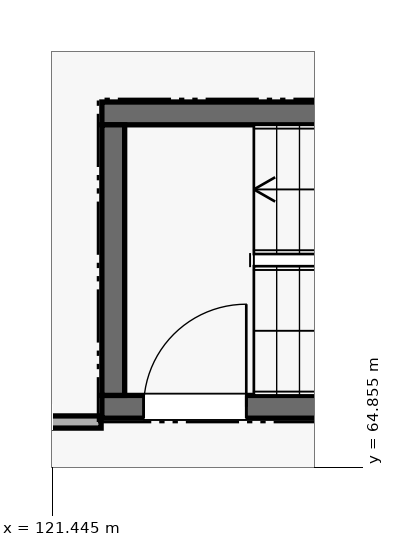
"""IFC4 building model, lengths in metres.
Left out: names, types, materials, properties, quantities, classifications, styles, units other than length and angle.
Written with IfcOpenShell. Run it as: python <this file> out.ifc"""

import sys

from ifc_helpers import new_model, si_unit, direction, frame, frame_2d, origin, place, context, subcontext, project, spatial, rectangle, extrude, element, fill, save


model = new_model("IFC4")
c1 = context("Model", 3, precision=1e-05, world=origin(), true_north=direction((0.0, 1.0)))
c2 = subcontext(c1, "Body", "Model", "MODEL_VIEW")
j1 = project(units=[si_unit("LENGTHUNIT", "METRE"), si_unit("PLANEANGLEUNIT", "RADIAN")], contexts=[c1])
p1 = place(None, origin())
s1 = spatial("IfcSite", under=j1, at=p1, CompositionType="ELEMENT")
p2 = place(p1, origin())
s2 = spatial("IfcBuilding", under=s1, at=p2, CompositionType="ELEMENT")
p3 = place(p2, frame((0.0, 0.0, 5.4)))
s3 = spatial("IfcBuildingStorey", under=s2, at=p3, CompositionType="ELEMENT", Elevation=5.4)
p4 = place(p3, frame((122.1, 65.65, 0.0), z_axis=(0.0, 0.0, 1.0), x_axis=(1.0, 0.0, 0.0)))
e1 = element("IfcWall", 1, at=p4, inside=s3, PredefinedType="SHEAR", context=c2, shape_type="SweptSolid", body=[
    extrude(rectangle(XDim=8.65, YDim=0.3, at=frame_2d((4.325, 0.0))), origin(), (0.0, 0.0, 1.0), 4.28),
])
p5 = place(p4, frame((0.55, 0.0, 0.0)))
e2 = element("IfcOpeningElement", 2, at=p5, cuts=e1, PredefinedType="OPENING", context=c2, shape_type="SweptSolid", body=[
    extrude(rectangle(XDim=1.35, YDim=2.2, at=frame_2d((0.675, 1.1))), frame((0.0, 0.16, 0.0), z_axis=(0.0, -1.0, 0.0), x_axis=(1.0, 0.0, 0.0)), (0.0, 0.0, 1.0), 0.32),
])
p6 = place(p3, frame((130.75, 69.51, 0.0), z_axis=(0.0, 0.0, 1.0), x_axis=(-1.0, 0.0, 0.0)))
e3 = element("IfcWall", 3, at=p6, inside=s3, PredefinedType="SHEAR", context=c2, shape_type="SweptSolid", body=[
    extrude(rectangle(XDim=8.65, YDim=0.3, at=frame_2d((4.325, 0.0))), origin(), (0.0, 0.0, 1.0), 4.28),
])
p7 = place(p3, frame((122.25, 69.36, 0.0), z_axis=(0.0, 0.0, 1.0), x_axis=(0.0, -1.0, 0.0)))
e4 = element("IfcWall", 4, at=p7, inside=s3, PredefinedType="SHEAR", context=c2, shape_type="SweptSolid", body=[
    extrude(rectangle(XDim=3.56, YDim=0.3, at=frame_2d((1.78, 0.0))), origin(), (0.0, 0.0, 1.0), 4.28),
])
p8 = place(p3, frame((106.05, 65.45, 0.0), z_axis=(0.0, 0.0, 1.0), x_axis=(1.0, 0.0, 0.0)))
e5 = element("IfcWall", 5, at=p8, inside=s3, PredefinedType="PARTITIONING", context=c2, shape_type="SweptSolid", body=[
    extrude(rectangle(XDim=16.04, YDim=0.16, at=frame_2d((8.02, 0.0))), origin(), (0.0, 0.0, 1.0), 3.739),
])
p9 = place(p8, frame((6.8, 0.0, 0.0)))
e6 = element("IfcOpeningElement", 6, at=p9, cuts=e5, PredefinedType="OPENING", context=c2, shape_type="SweptSolid", body=[
    extrude(rectangle(XDim=1.1, YDim=2.2, at=frame_2d((0.55, 1.1))), frame((0.0, 0.09, 0.0), z_axis=(0.0, -1.0, 0.0), x_axis=(1.0, 0.0, 0.0)), (0.0, 0.0, 1.0), 0.18),
])
p10 = place(p5, origin())
e7 = element("IfcDoor", 7, at=p10, inside=s3, OperationType="SINGLE_SWING_RIGHT", PredefinedType="DOOR", context=c2, shape_type="SweptSolid", body=[
    extrude(rectangle(XDim=1.35, YDim=2.2, at=frame_2d((0.675, 1.1))), frame((0.0, 0.025, 0.0), z_axis=(0.0, -1.0, 0.0), x_axis=(1.0, 0.0, 0.0)), (0.0, 0.0, 1.0), 0.05),
])
fill(e2, e7)
save(model, sys.argv[1])
